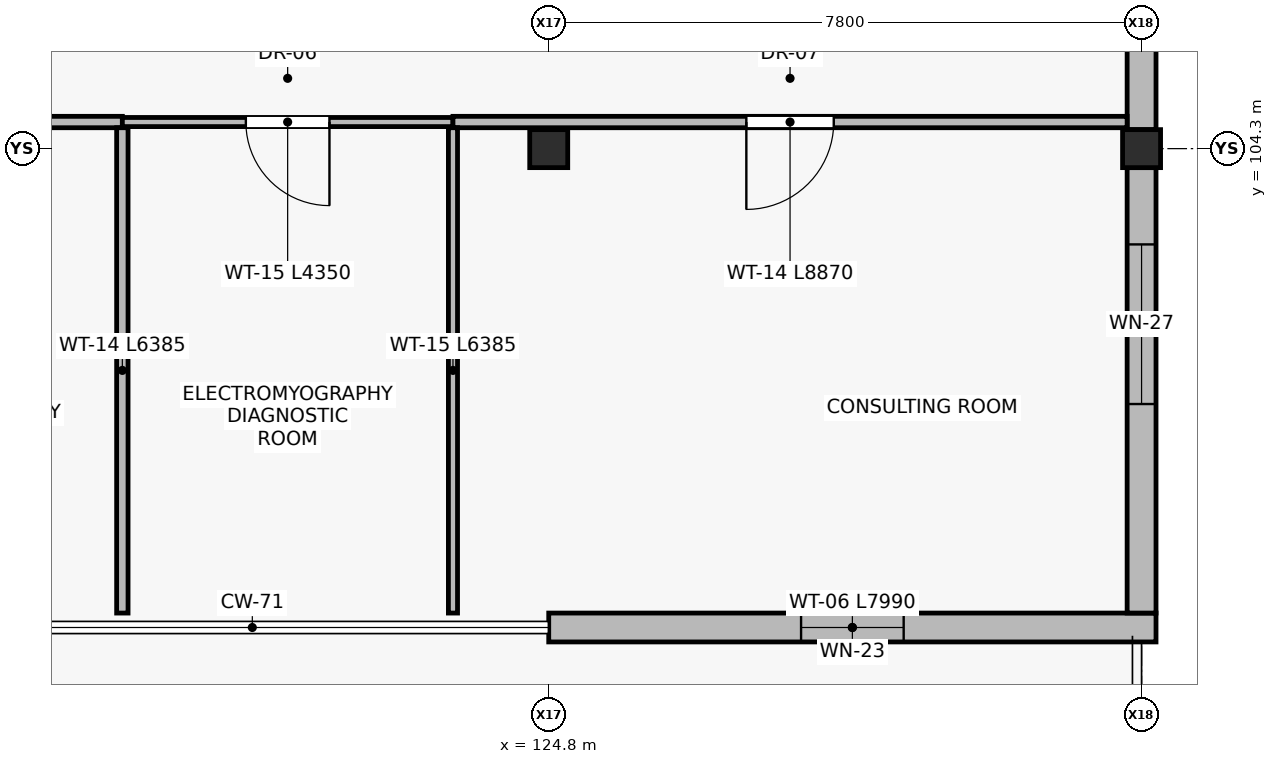
"""IFC4 building model, lengths in metres.
Left out: names, types, materials, properties, quantities, classifications, styles, units other than length and angle.
Written with IfcOpenShell. Run it as: python <this file> out.ifc"""

import sys

from ifc_helpers import new_model, si_unit, direction, frame, frame_2d, origin, origin_2d, place, context, subcontext, project, spatial, rectangle, extrude, element, fill, save


model = new_model("IFC4")
c1 = context("Model", 3, precision=1e-05, world=origin(), true_north=direction((0.0, 1.0)))
c2 = subcontext(c1, "Body", "Model", "MODEL_VIEW")
j1 = project(units=[si_unit("LENGTHUNIT", "METRE"), si_unit("PLANEANGLEUNIT", "RADIAN")], contexts=[c1])
p1 = place(None, origin())
s1 = spatial("IfcSite", under=j1, at=p1, CompositionType="ELEMENT")
p2 = place(p1, origin())
s2 = spatial("IfcBuilding", under=s1, at=p2, CompositionType="ELEMENT")
p3 = place(p2, frame((0.0, 0.0, 14.1)))
s3 = spatial("IfcBuildingStorey", under=s2, at=p3, CompositionType="ELEMENT", Elevation=14.1)
for number, where, z_axis, x_axis in (
    (1, (124.8, 104.3, 0.0), (0.0, 0.0, 1.0), (1.0, 0.0, 0.0)),
    (2, (132.6, 104.3, 0.0), (0.0, 0.0, 1.0), (1.0, 0.0, 0.0)),
):
    element("IfcColumn", number, at=place(p3, frame(where, z_axis=z_axis, x_axis=x_axis)), inside=s3, PredefinedType="COLUMN", context=c2, shape_type="SweptSolid", body=[
        extrude(rectangle(XDim=0.5, YDim=0.5, at=origin_2d()), origin(), (0.0, 0.0, 1.0), 4.5),
    ])
p4 = place(p3, frame((132.79, 98.0, 0.0), z_axis=(0.0, 0.0, 1.0), x_axis=(-1.0, 0.0, 0.0)))
e3 = element("IfcWall", 3, at=p4, inside=s3, PredefinedType="STANDARD", context=c2, shape_type="SweptSolid", body=[
    extrude(rectangle(XDim=7.99, YDim=0.38, at=frame_2d((3.995, 0.0))), origin(), (0.0, 0.0, 1.0), 4.26),
])
p5 = place(p4, frame((3.32, 0.0, 0.9)))
e4 = element("IfcOpeningElement", 4, at=p5, cuts=e3, PredefinedType="OPENING", context=c2, shape_type="SweptSolid", body=[
    extrude(rectangle(XDim=1.35, YDim=2.1, at=frame_2d((0.675, 1.05))), frame((0.0, 0.2, 0.0), z_axis=(0.0, -1.0, 0.0), x_axis=(1.0, 0.0, 0.0)), (0.0, 0.0, 1.0), 0.4),
])
p6 = place(p3, frame((132.6, 104.05, 0.0), z_axis=(0.0, 0.0, 1.0), x_axis=(0.0, -1.0, 0.0)))
e5 = element("IfcWall", 5, at=p6, inside=s3, PredefinedType="STANDARD", context=c2, shape_type="SweptSolid", body=[
    extrude(rectangle(XDim=5.86, YDim=0.38, at=frame_2d((2.93, 0.0))), origin(), (0.0, 0.0, 1.0), 3.84),
])
p7 = place(p6, frame((1.01, 0.0, 0.9)))
e6 = element("IfcOpeningElement", 6, at=p7, cuts=e5, PredefinedType="OPENING", context=c2, shape_type="SweptSolid", body=[
    extrude(rectangle(XDim=2.1, YDim=2.15, at=frame_2d((1.05, 1.075))), frame((0.0, 0.2, 0.0), z_axis=(0.0, -1.0, 0.0), x_axis=(1.0, 0.0, 0.0)), (0.0, 0.0, 1.0), 0.4),
])
p8 = place(p3, frame((132.6, 107.95, 0.0), z_axis=(0.0, 0.0, 1.0), x_axis=(0.0, -1.0, 0.0)))
e7 = element("IfcWall", 7, at=p8, inside=s3, PredefinedType="STANDARD", context=c2, shape_type="SweptSolid", body=[
    extrude(rectangle(XDim=3.4, YDim=0.38, at=frame_2d((1.7, 0.0))), origin(), (0.0, 0.0, 1.0), 3.84),
])
p9 = place(p8, frame((1.25, 0.0, 0.9)))
e8 = element("IfcOpeningElement", 8, at=p9, cuts=e7, PredefinedType="OPENING", context=c2, shape_type="SweptSolid", body=[
    extrude(rectangle(XDim=0.9, YDim=1.6, at=frame_2d((0.45, 0.8))), frame((0.0, 0.2, 0.0), z_axis=(0.0, -1.0, 0.0), x_axis=(1.0, 0.0, 0.0)), (0.0, 0.0, 1.0), 0.4),
])
p10 = place(p3, frame((119.19, 104.65, 0.0), z_axis=(0.0, 0.0, 1.0), x_axis=(-1.0, 0.0, 0.0)))
e9 = element("IfcWall", 9, at=p10, inside=s3, PredefinedType="PARTITIONING", context=c2, shape_type="SweptSolid", body=[
    extrude(rectangle(XDim=5.85, YDim=0.15, at=frame_2d((2.925, 0.0))), origin(), (0.0, 0.0, 1.0), 3.74),
])
p11 = place(p10, frame((3.278, 0.0, 0.0)))
e10 = element("IfcOpeningElement", 10, at=p11, cuts=e9, PredefinedType="OPENING", context=c2, shape_type="SweptSolid", body=[
    extrude(rectangle(XDim=1.05, YDim=2.15, at=frame_2d((0.525, 1.075))), frame((0.0, 0.085, 0.0), z_axis=(0.0, -1.0, 0.0), x_axis=(1.0, 0.0, 0.0)), (0.0, 0.0, 1.0), 0.17),
])
p12 = place(p3, frame((123.54, 104.65, 0.0), z_axis=(0.0, 0.0, 1.0), x_axis=(-1.0, 0.0, 0.0)))
e11 = element("IfcWall", 11, at=p12, inside=s3, PredefinedType="PARTITIONING", context=c2, shape_type="SweptSolid", body=[
    extrude(rectangle(XDim=4.35, YDim=0.12, at=frame_2d((2.175, 0.0))), origin(), (0.0, 0.0, 1.0), 3.74),
])
p13 = place(p12, frame((1.625, 0.0, 0.0)))
e12 = element("IfcOpeningElement", 12, at=p13, cuts=e11, PredefinedType="OPENING", context=c2, shape_type="SweptSolid", body=[
    extrude(rectangle(XDim=1.1, YDim=2.15, at=frame_2d((0.55, 1.075))), frame((0.0, 0.07, 0.0), z_axis=(0.0, -1.0, 0.0), x_axis=(1.0, 0.0, 0.0)), (0.0, 0.0, 1.0), 0.14),
])
p14 = place(p3, frame((132.41, 104.65, 0.0), z_axis=(0.0, 0.0, 1.0), x_axis=(-1.0, 0.0, 0.0)))
e13 = element("IfcWall", 13, at=p14, inside=s3, PredefinedType="PARTITIONING", context=c2, shape_type="SweptSolid", body=[
    extrude(rectangle(XDim=8.87, YDim=0.15, at=frame_2d((4.435, 0.0))), origin(), (0.0, 0.0, 1.0), 3.74),
])
p15 = place(p14, frame((3.86, 0.0, 0.0)))
e14 = element("IfcOpeningElement", 14, at=p15, cuts=e13, PredefinedType="OPENING", context=c2, shape_type="SweptSolid", body=[
    extrude(rectangle(XDim=1.15, YDim=2.2, at=frame_2d((0.575, 1.1))), frame((0.0, 0.085, 0.0), z_axis=(0.0, -1.0, 0.0), x_axis=(1.0, 0.0, 0.0)), (0.0, 0.0, 1.0), 0.17),
])
p16 = place(p3, frame((119.19, 98.19, 0.0), z_axis=(0.0, 0.0, 1.0), x_axis=(0.0, 1.0, 0.0)))
e15 = element("IfcWall", 15, at=p16, inside=s3, PredefinedType="PARTITIONING", context=c2, shape_type="SweptSolid", body=[
    extrude(rectangle(XDim=6.385, YDim=0.15, at=frame_2d((3.192, 0.0))), origin(), (0.0, 0.0, 1.0), 3.97),
])
p17 = place(p3, frame((123.54, 98.19, 0.0), z_axis=(0.0, 0.0, 1.0), x_axis=(0.0, 1.0, 0.0)))
e16 = element("IfcWall", 16, at=p17, inside=s3, PredefinedType="PARTITIONING", context=c2, shape_type="SweptSolid", body=[
    extrude(rectangle(XDim=6.385, YDim=0.12, at=frame_2d((3.192, 0.0))), origin(), (0.0, 0.0, 1.0), 4.26),
])
p18 = place(p5, origin())
e17 = element("IfcWindow", 17, at=p18, inside=s3, PartitioningType="SINGLE_PANEL", PredefinedType="WINDOW", context=c2, shape_type="SweptSolid", body=[
    extrude(rectangle(XDim=1.35, YDim=2.1, at=frame_2d((0.675, 1.05))), frame((0.0, 0.03, 0.0), z_axis=(0.0, -1.0, 0.0), x_axis=(1.0, 0.0, 0.0)), (0.0, 0.0, 1.0), 0.06),
])
fill(e4, e17)
p19 = place(p7, origin())
e18 = element("IfcWindow", 18, at=p19, inside=s3, PartitioningType="SINGLE_PANEL", PredefinedType="WINDOW", context=c2, shape_type="SweptSolid", body=[
    extrude(rectangle(XDim=2.1, YDim=2.15, at=frame_2d((1.05, 1.075))), frame((0.0, 0.03, 0.0), z_axis=(0.0, -1.0, 0.0), x_axis=(1.0, 0.0, 0.0)), (0.0, 0.0, 1.0), 0.06),
])
fill(e6, e18)
p20 = place(p13, origin())
e19 = element("IfcDoor", 19, at=p20, inside=s3, OperationType="SINGLE_SWING_LEFT", PredefinedType="DOOR", context=c2, shape_type="SweptSolid", body=[
    extrude(rectangle(XDim=1.1, YDim=2.15, at=frame_2d((0.55, 1.075))), frame((0.0, 0.025, 0.0), z_axis=(0.0, -1.0, 0.0), x_axis=(1.0, 0.0, 0.0)), (0.0, 0.0, 1.0), 0.05),
])
fill(e12, e19)
p21 = place(p15, origin())
e20 = element("IfcDoor", 20, at=p21, inside=s3, OperationType="SINGLE_SWING_RIGHT", PredefinedType="DOOR", context=c2, shape_type="SweptSolid", body=[
    extrude(rectangle(XDim=1.15, YDim=2.2, at=frame_2d((0.575, 1.1))), frame((0.0, 0.025, 0.0), z_axis=(0.0, -1.0, 0.0), x_axis=(1.0, 0.0, 0.0)), (0.0, 0.0, 1.0), 0.05),
])
fill(e14, e20)
save(model, sys.argv[1])
